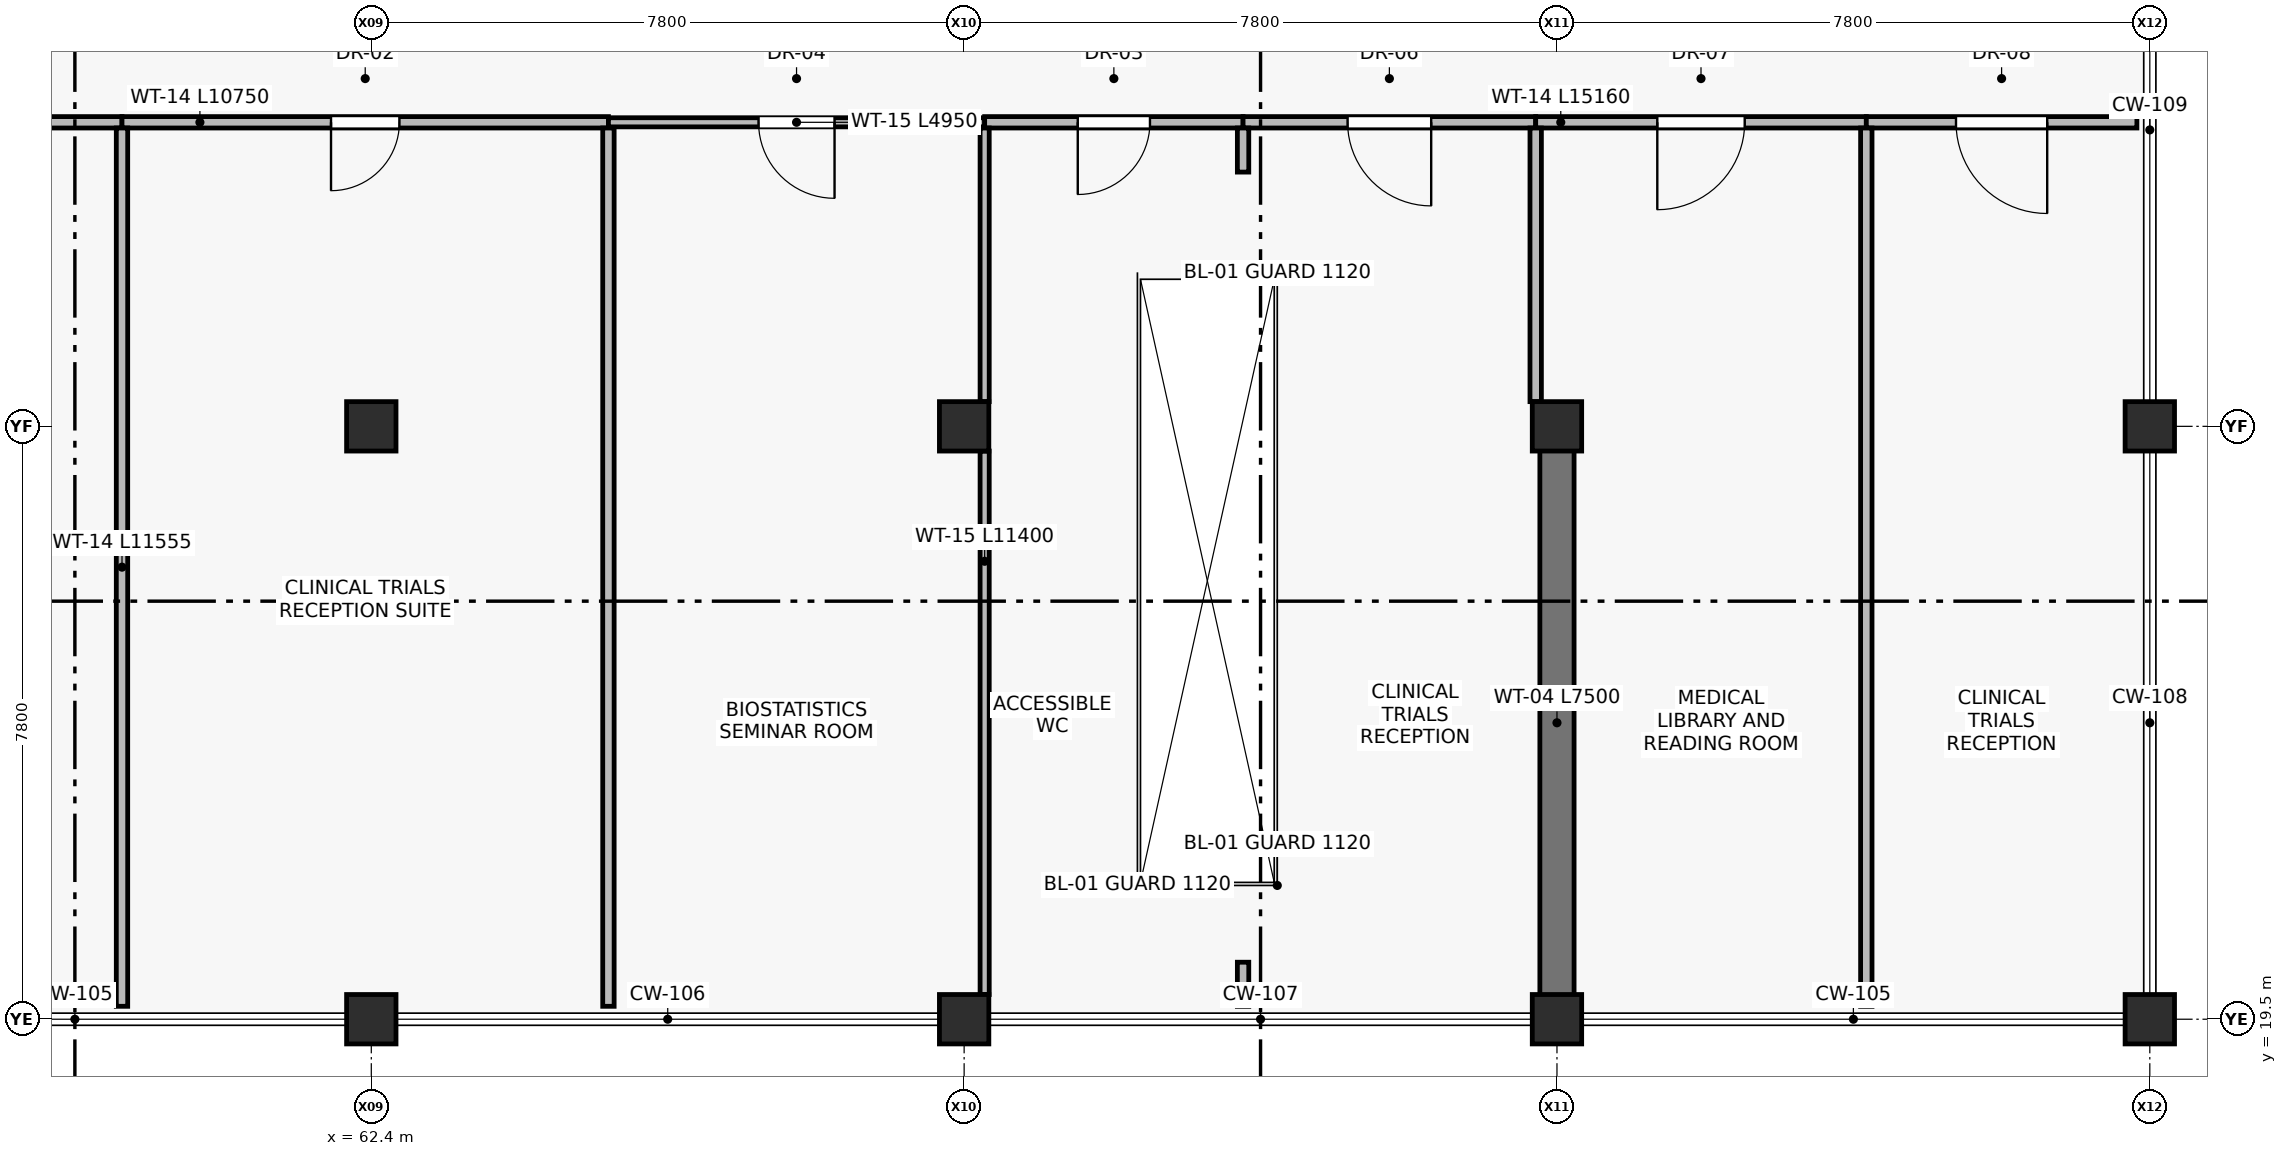
"""IFC4 building model, lengths in metres.
Left out: names, types, materials, properties, quantities, classifications, styles, units other than length and angle.
Written with IfcOpenShell. Run it as: python <this file> out.ifc"""

import sys

from ifc_helpers import new_model, si_unit, direction, frame, frame_2d, origin, origin_2d, place, context, subcontext, project, spatial, rectangle, extrude, element, fill, save


model = new_model("IFC4")
c1 = context("Model", 3, precision=1e-05, world=origin(), true_north=direction((0.0, 1.0)))
c2 = subcontext(c1, "Body", "Model", "MODEL_VIEW")
j1 = project(units=[si_unit("LENGTHUNIT", "METRE"), si_unit("PLANEANGLEUNIT", "RADIAN")], contexts=[c1])
p1 = place(None, origin())
s1 = spatial("IfcSite", under=j1, at=p1, CompositionType="ELEMENT")
p2 = place(p1, origin())
s2 = spatial("IfcBuilding", under=s1, at=p2, CompositionType="ELEMENT")
p3 = place(p2, frame((0.0, 0.0, 4.8)))
s3 = spatial("IfcBuildingStorey", under=s2, at=p3, CompositionType="ELEMENT", Elevation=4.8)
for number, where, z_axis, x_axis in (
    (1, (62.4, 19.5, 0.0), (0.0, 0.0, 1.0), (1.0, 0.0, 0.0)),
    (2, (62.4, 27.3, 0.0), (0.0, 0.0, 1.0), (1.0, 0.0, 0.0)),
    (3, (70.2, 19.5, 0.0), (0.0, 0.0, 1.0), (1.0, 0.0, 0.0)),
    (4, (70.2, 27.3, 0.0), (0.0, 0.0, 1.0), (1.0, 0.0, 0.0)),
    (5, (78.0, 19.5, 0.0), (0.0, 0.0, 1.0), (1.0, 0.0, 0.0)),
    (6, (78.0, 27.3, 0.0), (0.0, 0.0, 1.0), (1.0, 0.0, 0.0)),
    (7, (85.8, 19.5, 0.0), (0.0, 0.0, 1.0), (1.0, 0.0, 0.0)),
    (8, (85.8, 27.3, 0.0), (0.0, 0.0, 1.0), (1.0, 0.0, 0.0)),
):
    element("IfcColumn", number, at=place(p3, frame(where, z_axis=z_axis, x_axis=x_axis)), inside=s3, PredefinedType="COLUMN", context=c2, shape_type="SweptSolid", body=[
        extrude(rectangle(XDim=0.65, YDim=0.65, at=origin_2d()), origin(), (0.0, 0.0, 1.0), 4.8),
    ])
p4 = place(p3, frame((78.0, 19.65, 0.0), z_axis=(0.0, 0.0, 1.0), x_axis=(0.0, 1.0, 0.0)))
e9 = element("IfcWall", 9, at=p4, inside=s3, PredefinedType="SHEAR", context=c2, shape_type="SweptSolid", body=[
    extrude(rectangle(XDim=7.5, YDim=0.45, at=frame_2d((3.75, 0.0))), origin(), (0.0, 0.0, 1.0), 4.54),
])
p5 = place(p3, frame((59.12, 31.3, 0.0), z_axis=(0.0, 0.0, 1.0), x_axis=(-1.0, 0.0, 0.0)))
e10 = element("IfcWall", 10, at=p5, inside=s3, PredefinedType="PARTITIONING", context=c2, shape_type="SweptSolid", body=[
    extrude(rectangle(XDim=4.35, YDim=0.15, at=frame_2d((2.175, 0.0))), origin(), (0.0, 0.0, 1.0), 4.54),
])
p6 = place(p5, frame((1.315, 0.0, 0.0)))
e11 = element("IfcOpeningElement", 11, at=p6, cuts=e10, PredefinedType="OPENING", context=c2, shape_type="SweptSolid", body=[
    extrude(rectangle(XDim=1.72, YDim=2.3, at=frame_2d((0.86, 1.15))), frame((0.0, 0.085, 0.0), z_axis=(0.0, -1.0, 0.0), x_axis=(1.0, 0.0, 0.0)), (0.0, 0.0, 1.0), 0.17),
])
p7 = place(p3, frame((65.52, 31.3, 0.0), z_axis=(0.0, 0.0, 1.0), x_axis=(-1.0, 0.0, 0.0)))
e12 = element("IfcWall", 12, at=p7, inside=s3, PredefinedType="PARTITIONING", context=c2, shape_type="SweptSolid", body=[
    extrude(rectangle(XDim=6.4, YDim=0.15, at=frame_2d((3.2, 0.0))), origin(), (0.0, 0.0, 1.0), 4.54),
])
p8 = place(p7, frame((2.75, 0.0, 0.0)))
e13 = element("IfcOpeningElement", 13, at=p8, cuts=e12, PredefinedType="OPENING", context=c2, shape_type="SweptSolid", body=[
    extrude(rectangle(XDim=0.9, YDim=2.1, at=frame_2d((0.45, 1.05))), frame((0.0, 0.085, 0.0), z_axis=(0.0, -1.0, 0.0), x_axis=(1.0, 0.0, 0.0)), (0.0, 0.0, 1.0), 0.17),
])
p9 = place(p3, frame((70.47, 31.3, 0.0), z_axis=(0.0, 0.0, 1.0), x_axis=(-1.0, 0.0, 0.0)))
e14 = element("IfcWall", 14, at=p9, inside=s3, PredefinedType="PARTITIONING", context=c2, shape_type="SweptSolid", body=[
    extrude(rectangle(XDim=4.95, YDim=0.12, at=frame_2d((2.475, 0.0))), origin(), (0.0, 0.0, 1.0), 4.54),
])
p10 = place(p9, frame((1.975, 0.0, 0.0)))
e15 = element("IfcOpeningElement", 15, at=p10, cuts=e14, PredefinedType="OPENING", context=c2, shape_type="SweptSolid", body=[
    extrude(rectangle(XDim=1.0, YDim=2.1, at=frame_2d((0.5, 1.05))), frame((0.0, 0.07, 0.0), z_axis=(0.0, -1.0, 0.0), x_axis=(1.0, 0.0, 0.0)), (0.0, 0.0, 1.0), 0.14),
])
p11 = place(p3, frame((73.87, 31.3, 0.0), z_axis=(0.0, 0.0, 1.0), x_axis=(-1.0, 0.0, 0.0)))
e16 = element("IfcWall", 16, at=p11, inside=s3, PredefinedType="PARTITIONING", context=c2, shape_type="SweptSolid", body=[
    extrude(rectangle(XDim=3.4, YDim=0.15, at=frame_2d((1.7, 0.0))), origin(), (0.0, 0.0, 1.0), 4.54),
])
p12 = place(p11, frame((1.225, 0.0, 0.0)))
e17 = element("IfcOpeningElement", 17, at=p12, cuts=e16, PredefinedType="OPENING", context=c2, shape_type="SweptSolid", body=[
    extrude(rectangle(XDim=0.95, YDim=2.1, at=frame_2d((0.475, 1.05))), frame((0.0, 0.085, 0.0), z_axis=(0.0, -1.0, 0.0), x_axis=(1.0, 0.0, 0.0)), (0.0, 0.0, 1.0), 0.17),
])
p13 = place(p3, frame((77.72, 31.3, 0.0), z_axis=(0.0, 0.0, 1.0), x_axis=(-1.0, 0.0, 0.0)))
e18 = element("IfcWall", 18, at=p13, inside=s3, PredefinedType="PARTITIONING", context=c2, shape_type="SweptSolid", body=[
    extrude(rectangle(XDim=3.85, YDim=0.15, at=frame_2d((1.925, 0.0))), origin(), (0.0, 0.0, 1.0), 4.54),
])
p14 = place(p13, frame((1.375, 0.0, 0.0)))
e19 = element("IfcOpeningElement", 19, at=p14, cuts=e18, PredefinedType="OPENING", context=c2, shape_type="SweptSolid", body=[
    extrude(rectangle(XDim=1.1, YDim=2.15, at=frame_2d((0.55, 1.075))), frame((0.0, 0.085, 0.0), z_axis=(0.0, -1.0, 0.0), x_axis=(1.0, 0.0, 0.0)), (0.0, 0.0, 1.0), 0.17),
])
p15 = place(p3, frame((82.07, 31.3, 0.0), z_axis=(0.0, 0.0, 1.0), x_axis=(-1.0, 0.0, 0.0)))
e20 = element("IfcWall", 20, at=p15, inside=s3, PredefinedType="PARTITIONING", context=c2, shape_type="SweptSolid", body=[
    extrude(rectangle(XDim=4.35, YDim=0.15, at=frame_2d((2.175, 0.0))), origin(), (0.0, 0.0, 1.0), 4.54),
])
p16 = place(p15, frame((1.6, 0.0, 0.0)))
e21 = element("IfcOpeningElement", 21, at=p16, cuts=e20, PredefinedType="OPENING", context=c2, shape_type="SweptSolid", body=[
    extrude(rectangle(XDim=1.15, YDim=2.2, at=frame_2d((0.575, 1.1))), frame((0.0, 0.085, 0.0), z_axis=(0.0, -1.0, 0.0), x_axis=(1.0, 0.0, 0.0)), (0.0, 0.0, 1.0), 0.17),
])
p17 = place(p3, frame((85.63, 31.3, 0.0), z_axis=(0.0, 0.0, 1.0), x_axis=(-1.0, 0.0, 0.0)))
e22 = element("IfcWall", 22, at=p17, inside=s3, PredefinedType="PARTITIONING", context=c2, shape_type="SweptSolid", body=[
    extrude(rectangle(XDim=3.56, YDim=0.15, at=frame_2d((1.78, 0.0))), origin(), (0.0, 0.0, 1.0), 4.54),
])
p18 = place(p17, frame((1.18, 0.0, 0.0)))
e23 = element("IfcOpeningElement", 23, at=p18, cuts=e22, PredefinedType="OPENING", context=c2, shape_type="SweptSolid", body=[
    extrude(rectangle(XDim=1.2, YDim=2.2, at=frame_2d((0.6, 1.1))), frame((0.0, 0.085, 0.0), z_axis=(0.0, -1.0, 0.0), x_axis=(1.0, 0.0, 0.0)), (0.0, 0.0, 1.0), 0.17),
])
for number, where, z_axis, x_axis in (
    (24, (59.12, 19.67, 0.0), (0.0, 0.0, 1.0), (0.0, 1.0, 0.0)),
    (25, (65.52, 19.67, 0.0), (0.0, 0.0, 1.0), (0.0, 1.0, 0.0)),
):
    element("IfcWall", number, at=place(p3, frame(where, z_axis=z_axis, x_axis=x_axis)), inside=s3, PredefinedType="PARTITIONING", context=c2, shape_type="SweptSolid", body=[
        extrude(rectangle(XDim=11.555, YDim=0.15, at=frame_2d((5.778, 0.0))), origin(), (0.0, 0.0, 1.0), 4.54),
    ])
p19 = place(p3, frame((70.47, 19.825, 0.0), z_axis=(0.0, 0.0, 1.0), x_axis=(0.0, 1.0, 0.0)))
e26 = element("IfcWall", 26, at=p19, inside=s3, PredefinedType="PARTITIONING", context=c2, shape_type="SweptSolid", body=[
    extrude(rectangle(XDim=7.15, YDim=0.12, at=frame_2d((3.575, 0.0))), origin(), (0.0, 0.0, 1.0), 3.39),
])
p20 = place(p3, frame((70.47, 27.625, 0.0), z_axis=(0.0, 0.0, 1.0), x_axis=(0.0, 1.0, 0.0)))
e27 = element("IfcWall", 27, at=p20, inside=s3, PredefinedType="PARTITIONING", context=c2, shape_type="SweptSolid", body=[
    extrude(rectangle(XDim=3.6, YDim=0.12, at=frame_2d((1.8, 0.0))), origin(), (0.0, 0.0, 1.0), 3.39),
])
for number, where, z_axis, x_axis in (
    (28, (73.87, 19.67, 0.0), (0.0, 0.0, 1.0), (0.0, 1.0, 0.0)),
    (29, (73.87, 30.645, 0.0), (0.0, 0.0, 1.0), (0.0, 1.0, 0.0)),
):
    element("IfcWall", number, at=place(p3, frame(where, z_axis=z_axis, x_axis=x_axis)), inside=s3, PredefinedType="PARTITIONING", context=c2, shape_type="SweptSolid", body=[
        extrude(rectangle(XDim=0.58, YDim=0.15, at=frame_2d((0.29, 0.0))), origin(), (0.0, 0.0, 1.0), 4.54),
    ])
p21 = place(p3, frame((77.72, 27.625, 0.0), z_axis=(0.0, 0.0, 1.0), x_axis=(0.0, 1.0, 0.0)))
e30 = element("IfcWall", 30, at=p21, inside=s3, PredefinedType="PARTITIONING", context=c2, shape_type="SweptSolid", body=[
    extrude(rectangle(XDim=3.6, YDim=0.15, at=frame_2d((1.8, 0.0))), origin(), (0.0, 0.0, 1.0), 4.09),
])
p22 = place(p3, frame((82.07, 19.67, 0.0), z_axis=(0.0, 0.0, 1.0), x_axis=(0.0, 1.0, 0.0)))
e31 = element("IfcWall", 31, at=p22, inside=s3, PredefinedType="PARTITIONING", context=c2, shape_type="SweptSolid", body=[
    extrude(rectangle(XDim=11.555, YDim=0.15, at=frame_2d((5.778, 0.0))), origin(), (0.0, 0.0, 1.0), 4.54),
])
p23 = place(p8, origin())
e32 = element("IfcDoor", 32, at=p23, inside=s3, OperationType="SINGLE_SWING_RIGHT", PredefinedType="DOOR", context=c2, shape_type="SweptSolid", body=[
    extrude(rectangle(XDim=0.9, YDim=2.1, at=frame_2d((0.45, 1.05))), frame((0.0, 0.025, 0.0), z_axis=(0.0, -1.0, 0.0), x_axis=(1.0, 0.0, 0.0)), (0.0, 0.0, 1.0), 0.05),
])
fill(e13, e32)
p24 = place(p10, origin())
e33 = element("IfcDoor", 33, at=p24, inside=s3, OperationType="SINGLE_SWING_LEFT", PredefinedType="DOOR", context=c2, shape_type="SweptSolid", body=[
    extrude(rectangle(XDim=1.0, YDim=2.1, at=frame_2d((0.5, 1.05))), frame((0.0, 0.025, 0.0), z_axis=(0.0, -1.0, 0.0), x_axis=(1.0, 0.0, 0.0)), (0.0, 0.0, 1.0), 0.05),
])
fill(e15, e33)
p25 = place(p12, origin())
e34 = element("IfcDoor", 34, at=p25, inside=s3, OperationType="SINGLE_SWING_RIGHT", PredefinedType="DOOR", context=c2, shape_type="SweptSolid", body=[
    extrude(rectangle(XDim=0.95, YDim=2.1, at=frame_2d((0.475, 1.05))), frame((0.0, 0.025, 0.0), z_axis=(0.0, -1.0, 0.0), x_axis=(1.0, 0.0, 0.0)), (0.0, 0.0, 1.0), 0.05),
])
fill(e17, e34)
p26 = place(p14, origin())
e35 = element("IfcDoor", 35, at=p26, inside=s3, OperationType="SINGLE_SWING_LEFT", PredefinedType="DOOR", context=c2, shape_type="SweptSolid", body=[
    extrude(rectangle(XDim=1.1, YDim=2.15, at=frame_2d((0.55, 1.075))), frame((0.0, 0.025, 0.0), z_axis=(0.0, -1.0, 0.0), x_axis=(1.0, 0.0, 0.0)), (0.0, 0.0, 1.0), 0.05),
])
fill(e19, e35)
p27 = place(p16, origin())
e36 = element("IfcDoor", 36, at=p27, inside=s3, OperationType="SINGLE_SWING_RIGHT", PredefinedType="DOOR", context=c2, shape_type="SweptSolid", body=[
    extrude(rectangle(XDim=1.15, YDim=2.2, at=frame_2d((0.575, 1.1))), frame((0.0, 0.025, 0.0), z_axis=(0.0, -1.0, 0.0), x_axis=(1.0, 0.0, 0.0)), (0.0, 0.0, 1.0), 0.05),
])
fill(e21, e36)
p28 = place(p18, origin())
e37 = element("IfcDoor", 37, at=p28, inside=s3, OperationType="SINGLE_SWING_LEFT", PredefinedType="DOOR", context=c2, shape_type="SweptSolid", body=[
    extrude(rectangle(XDim=1.2, YDim=2.2, at=frame_2d((0.6, 1.1))), frame((0.0, 0.025, 0.0), z_axis=(0.0, -1.0, 0.0), x_axis=(1.0, 0.0, 0.0)), (0.0, 0.0, 1.0), 0.05),
])
fill(e23, e37)
save(model, sys.argv[1])
